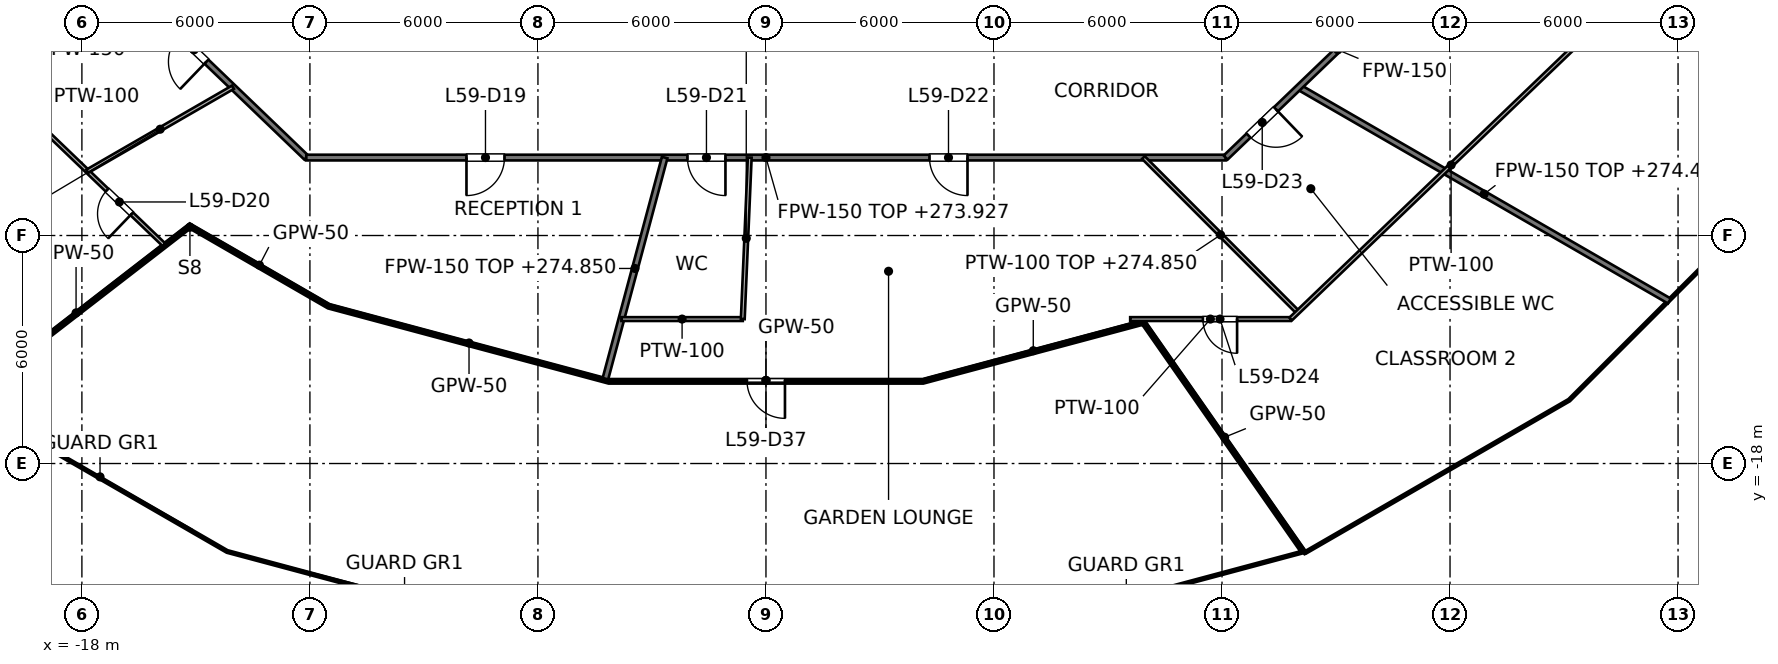
"""IFC4 building model, lengths in metres.
Left out: names, types, materials, properties, quantities, classifications, styles, units other than length and angle.
Written with IfcOpenShell. Run it as: python <this file> out.ifc"""

import sys

from ifc_helpers import new_model, si_unit, direction, frame, frame_2d, origin, place, context, subcontext, project, spatial, rectangle, extrude, element, fill, save


model = new_model("IFC4")
c1 = context("Model", 3, precision=1e-05, world=origin(), true_north=direction((0.0, 1.0)))
c2 = subcontext(c1, "Body", "Model", "MODEL_VIEW")
j1 = project(units=[si_unit("LENGTHUNIT", "METRE"), si_unit("PLANEANGLEUNIT", "RADIAN")], contexts=[c1])
p1 = place(None, origin())
s1 = spatial("IfcSite", under=j1, at=p1, CompositionType="ELEMENT")
p2 = place(p1, origin())
s2 = spatial("IfcBuilding", under=s1, at=p2, CompositionType="ELEMENT")
p3 = place(p2, frame((0.0, 0.0, 271.0)))
s3 = spatial("IfcBuildingStorey", under=s2, at=p3, CompositionType="ELEMENT", Elevation=271.0)
p4 = place(p3, frame((-18.0, -4.278, 0.0), z_axis=(0.0, 0.0, 1.0), x_axis=(0.721260976692, -0.69266341285, 0.0)))
e1 = element("IfcWall", 1, at=p4, inside=s3, PredefinedType="PARTITIONING", context=c2, shape_type="SweptSolid", body=[
    extrude(rectangle(XDim=8.187, YDim=0.15, at=frame_2d((4.094, 0.0))), origin(), (0.0, 0.0, 1.0), 2.918),
])
p5 = place(p4, frame((3.544, 0.0, 0.0)))
e2 = element("IfcOpeningElement", 2, at=p5, cuts=e1, PredefinedType="OPENING", context=c2, shape_type="SweptSolid", body=[
    extrude(rectangle(XDim=1.0, YDim=2.1, at=frame_2d((0.5, 1.05))), frame((0.0, 0.075, 0.0), z_axis=(0.0, -1.0, 0.0), x_axis=(1.0, 0.0, 0.0)), (0.0, 0.0, 1.0), 0.15),
])
p6 = place(p3, frame((14.024, -8.096, 0.0), z_axis=(0.0, 0.0, 1.0), x_axis=(0.866020158842, -0.500009084397, 0.0)))
e3 = element("IfcWall", 3, at=p6, inside=s3, PredefinedType="PARTITIONING", context=c2, shape_type="SweptSolid", body=[
    extrude(rectangle(XDim=11.256, YDim=0.15, at=frame_2d((5.628, 0.0))), origin(), (0.0, 0.0, 1.0), 3.475),
])
p7 = place(p3, frame((-12.095, -9.949, 0.0), z_axis=(0.0, 0.0, 1.0), x_axis=(1.0, 0.0, 0.0)))
e4 = element("IfcWall", 4, at=p7, inside=s3, PredefinedType="PARTITIONING", context=c2, shape_type="SweptSolid", body=[
    extrude(rectangle(XDim=24.19, YDim=0.15, at=frame_2d((12.095, 0.0))), origin(), (0.0, 0.0, 1.0), 2.927),
])
p8 = place(p7, frame((4.215, 0.0, 0.0)))
e5 = element("IfcOpeningElement", 5, at=p8, cuts=e4, PredefinedType="OPENING", context=c2, shape_type="SweptSolid", body=[
    extrude(rectangle(XDim=1.0, YDim=2.1, at=frame_2d((0.5, 1.05))), frame((0.0, 0.075, 0.0), z_axis=(0.0, -1.0, 0.0), x_axis=(1.0, 0.0, 0.0)), (0.0, 0.0, 1.0), 0.15),
])
p9 = place(p7, frame((10.029, 0.0, 0.0)))
e6 = element("IfcOpeningElement", 6, at=p9, cuts=e4, PredefinedType="OPENING", context=c2, shape_type="SweptSolid", body=[
    extrude(rectangle(XDim=1.0, YDim=2.1, at=frame_2d((0.5, 1.05))), frame((0.0, 0.075, 0.0), z_axis=(0.0, -1.0, 0.0), x_axis=(1.0, 0.0, 0.0)), (0.0, 0.0, 1.0), 0.15),
])
p10 = place(p7, frame((16.398, 0.0, 0.0)))
e7 = element("IfcOpeningElement", 7, at=p10, cuts=e4, PredefinedType="OPENING", context=c2, shape_type="SweptSolid", body=[
    extrude(rectangle(XDim=1.0, YDim=2.1, at=frame_2d((0.5, 1.05))), frame((0.0, 0.075, 0.0), z_axis=(0.0, -1.0, 0.0), x_axis=(1.0, 0.0, 0.0)), (0.0, 0.0, 1.0), 0.15),
])
p11 = place(p3, frame((12.095, -9.949, 0.0), z_axis=(0.0, 0.0, 1.0), x_axis=(0.721246078931, 0.692678925352, 0.0)))
e8 = element("IfcWall", 8, at=p11, inside=s3, PredefinedType="PARTITIONING", context=c2, shape_type="SweptSolid", body=[
    extrude(rectangle(XDim=8.187, YDim=0.15, at=frame_2d((4.094, 0.0))), origin(), (0.0, 0.0, 1.0), 2.918),
])
p12 = place(p11, frame((0.836, 0.0, 0.0)))
e9 = element("IfcOpeningElement", 9, at=p12, cuts=e8, PredefinedType="OPENING", context=c2, shape_type="SweptSolid", body=[
    extrude(rectangle(XDim=1.0, YDim=2.1, at=frame_2d((0.5, 1.05))), frame((0.0, 0.075, 0.0), z_axis=(0.0, -1.0, 0.0), x_axis=(1.0, 0.0, 0.0)), (0.0, 0.0, 1.0), 0.15),
])
p13 = place(p3, frame((-4.229, -15.785, 0.0), z_axis=(0.0, 0.0, 1.0), x_axis=(0.258789276249, 0.965933802338, 0.0)))
e10 = element("IfcWall", 10, at=p13, inside=s3, PredefinedType="PARTITIONING", context=c2, shape_type="SweptSolid", body=[
    extrude(rectangle(XDim=6.042, YDim=0.15, at=frame_2d((3.021, 0.0))), origin(), (0.0, 0.0, 1.0), 3.85),
])
p14 = place(p3, frame((9.94, -14.255, 0.0), z_axis=(0.0, 0.0, 1.0), x_axis=(0.571993311717, -0.820258283318, 0.0)))
e11 = element("IfcWall", 11, at=p14, inside=s3, PredefinedType="PARTITIONING", context=c2, shape_type="SweptSolid", body=[
    extrude(rectangle(XDim=7.444, YDim=0.05, at=frame_2d((3.722, 0.0))), origin(), (0.0, 0.0, 1.0), 2.927),
])
p15 = place(p3, frame((-15.161, -11.722, 0.0), z_axis=(0.0, 0.0, 1.0), x_axis=(0.866015533237, -0.5000170959, 0.0)))
e12 = element("IfcWall", 12, at=p15, inside=s3, PredefinedType="PARTITIONING", context=c2, shape_type="SweptSolid", body=[
    extrude(rectangle(XDim=4.232, YDim=0.05, at=frame_2d((2.116, 0.0))), origin(), (0.0, 0.0, 1.0), 2.927),
])
p16 = place(p3, frame((-11.496, -13.838, 0.0), z_axis=(0.0, 0.0, 1.0), x_axis=(0.965689277524, -0.259700248891, 0.0)))
e13 = element("IfcWall", 13, at=p16, inside=s3, PredefinedType="PARTITIONING", context=c2, shape_type="SweptSolid", body=[
    extrude(rectangle(XDim=7.627, YDim=0.05, at=frame_2d((3.813, 0.0))), origin(), (0.0, 0.0, 1.0), 2.927),
])
p17 = place(p3, frame((-4.129, -15.812, 0.0), z_axis=(0.0, 0.0, 1.0), x_axis=(1.0, 0.0, 0.0)))
e14 = element("IfcWall", 14, at=p17, inside=s3, PredefinedType="PARTITIONING", context=c2, shape_type="SweptSolid", body=[
    extrude(rectangle(XDim=8.258, YDim=0.05, at=frame_2d((4.129, 0.0))), origin(), (0.0, 0.0, 1.0), 2.927),
])
p18 = place(p17, frame((3.629, 0.0, 0.0)))
e15 = element("IfcOpeningElement", 15, at=p18, cuts=e14, PredefinedType="OPENING", context=c2, shape_type="SweptSolid", body=[
    extrude(rectangle(XDim=1.0, YDim=2.1, at=frame_2d((0.5, 1.05))), frame((0.0, 0.025, 0.0), z_axis=(0.0, -1.0, 0.0), x_axis=(1.0, 0.0, 0.0)), (0.0, 0.0, 1.0), 0.05),
])
p19 = place(p3, frame((4.129, -15.812, 0.0), z_axis=(0.0, 0.0, 1.0), x_axis=(0.965726557123, 0.259561585887, 0.0)))
e16 = element("IfcWall", 16, at=p19, inside=s3, PredefinedType="PARTITIONING", context=c2, shape_type="SweptSolid", body=[
    extrude(rectangle(XDim=6.016, YDim=0.05, at=frame_2d((3.008, 0.0))), origin(), (0.0, 0.0, 1.0), 2.927),
])
p20 = place(p3, frame((-21.146, -16.349, 0.0), z_axis=(0.0, 0.0, 1.0), x_axis=(0.791194145186, 0.611565061644, 0.0)))
e17 = element("IfcWall", 17, at=p20, inside=s3, PredefinedType="PARTITIONING", context=c2, shape_type="SweptSolid", body=[
    extrude(rectangle(XDim=7.565, YDim=0.05, at=frame_2d((3.782, 0.0))), origin(), (0.0, 0.0, 1.0), 2.927),
])
p21 = place(p3, frame((9.932, -9.949, 0.0), z_axis=(0.0, 0.0, 1.0), x_axis=(0.70649080711, -0.707722219143, 0.0)))
e18 = element("IfcWall", 18, at=p21, inside=s3, PredefinedType="PARTITIONING", context=c2, shape_type="SweptSolid", body=[
    extrude(rectangle(XDim=5.75, YDim=0.1, at=frame_2d((2.875, 0.0))), origin(), (0.0, 0.0, 1.0), 3.85),
])
p22 = place(p3, frame((-22.25, -6.089, 0.0), z_axis=(0.0, 0.0, 1.0), x_axis=(0.721325844404, -0.692595860654, 0.0)))
e19 = element("IfcWall", 19, at=p22, inside=s3, PredefinedType="PARTITIONING", context=c2, shape_type="SweptSolid", body=[
    extrude(rectangle(XDim=8.889, YDim=0.1, at=frame_2d((4.444, 0.0))), origin(), (0.0, 0.0, 1.0), 2.927),
])
p23 = place(p22, frame((6.81, 0.0, 0.0)))
e20 = element("IfcOpeningElement", 20, at=p23, cuts=e19, PredefinedType="OPENING", context=c2, shape_type="SweptSolid", body=[
    extrude(rectangle(XDim=0.9, YDim=2.1, at=frame_2d((0.45, 1.05))), frame((0.0, 0.05, 0.0), z_axis=(0.0, -1.0, 0.0), x_axis=(1.0, 0.0, 0.0)), (0.0, 0.0, 1.0), 0.1),
])
p24 = place(p3, frame((-3.804, -14.199, 0.0), z_axis=(0.0, 0.0, 1.0), x_axis=(1.0, 0.0, 0.0)))
e21 = element("IfcWall", 21, at=p24, inside=s3, PredefinedType="PARTITIONING", context=c2, shape_type="SweptSolid", body=[
    extrude(rectangle(XDim=3.194, YDim=0.1, at=frame_2d((1.597, 0.0))), origin(), (0.0, 0.0, 1.0), 2.927),
])
p25 = place(p3, frame((9.584, -14.199, 0.0), z_axis=(0.0, 0.0, 1.0), x_axis=(1.0, 0.0, 0.0)))
e22 = element("IfcWall", 22, at=p25, inside=s3, PredefinedType="PARTITIONING", context=c2, shape_type="SweptSolid", body=[
    extrude(rectangle(XDim=4.221, YDim=0.1, at=frame_2d((2.11, 0.0))), origin(), (0.0, 0.0, 1.0), 2.927),
])
p26 = place(p25, frame((1.913, 0.0, 0.0)))
e23 = element("IfcOpeningElement", 23, at=p26, cuts=e22, PredefinedType="OPENING", context=c2, shape_type="SweptSolid", body=[
    extrude(rectangle(XDim=0.9, YDim=2.1, at=frame_2d((0.45, 1.05))), frame((0.0, 0.05, 0.0), z_axis=(0.0, -1.0, 0.0), x_axis=(1.0, 0.0, 0.0)), (0.0, 0.0, 1.0), 0.1),
])
p27 = place(p3, frame((-17.856, -10.309, 0.0), z_axis=(0.0, 0.0, 1.0), x_axis=(0.866051440883, 0.49995489971, 0.0)))
e24 = element("IfcWall", 24, at=p27, inside=s3, PredefinedType="PARTITIONING", context=c2, shape_type="SweptSolid", body=[
    extrude(rectangle(XDim=4.425, YDim=0.1, at=frame_2d((2.212, 0.0))), origin(), (0.0, 0.0, 1.0), 3.85),
])
p28 = place(p3, frame((13.805, -14.199, 0.0), z_axis=(0.0, 0.0, 1.0), x_axis=(0.721419404794, 0.692498406053, 0.0)))
e25 = element("IfcWall", 25, at=p28, inside=s3, PredefinedType="PARTITIONING", context=c2, shape_type="SweptSolid", body=[
    extrude(rectangle(XDim=11.708, YDim=0.1, at=frame_2d((5.854, 0.0))), origin(), (0.0, 0.0, 1.0), 2.927),
])
p29 = place(p3, frame((-0.61, -14.199, 0.0), z_axis=(0.0, 0.0, 1.0), x_axis=(0.04304370936, 0.999073190054, 0.0)))
e26 = element("IfcWall", 26, at=p29, inside=s3, PredefinedType="PARTITIONING", context=c2, shape_type="SweptSolid", body=[
    extrude(rectangle(XDim=4.254, YDim=0.1, at=frame_2d((2.127, 0.0))), origin(), (0.0, 0.0, 1.0), 3.85),
])
p30 = place(p5, origin())
e27 = element("IfcDoor", 27, at=p30, inside=s3, OperationType="SINGLE_SWING_RIGHT", PredefinedType="DOOR", context=c2, shape_type="SweptSolid", body=[
    extrude(rectangle(XDim=1.0, YDim=2.1, at=frame_2d((0.5, 1.05))), frame((0.0, 0.025, 0.0), z_axis=(0.0, -1.0, 0.0), x_axis=(1.0, 0.0, 0.0)), (0.0, 0.0, 1.0), 0.05),
])
fill(e2, e27)
p31 = place(p8, origin())
e28 = element("IfcDoor", 28, at=p31, inside=s3, OperationType="SINGLE_SWING_LEFT", PredefinedType="DOOR", context=c2, shape_type="SweptSolid", body=[
    extrude(rectangle(XDim=1.0, YDim=2.1, at=frame_2d((0.5, 1.05))), frame((0.0, 0.025, 0.0), z_axis=(0.0, -1.0, 0.0), x_axis=(1.0, 0.0, 0.0)), (0.0, 0.0, 1.0), 0.05),
])
fill(e5, e28)
p32 = place(p23, origin())
e29 = element("IfcDoor", 29, at=p32, inside=s3, OperationType="SINGLE_SWING_RIGHT", PredefinedType="DOOR", context=c2, shape_type="SweptSolid", body=[
    extrude(rectangle(XDim=0.9, YDim=2.1, at=frame_2d((0.45, 1.05))), frame((0.0, 0.025, 0.0), z_axis=(0.0, -1.0, 0.0), x_axis=(1.0, 0.0, 0.0)), (0.0, 0.0, 1.0), 0.05),
])
fill(e20, e29)
p33 = place(p9, origin())
e30 = element("IfcDoor", 30, at=p33, inside=s3, OperationType="SINGLE_SWING_RIGHT", PredefinedType="DOOR", context=c2, shape_type="SweptSolid", body=[
    extrude(rectangle(XDim=1.0, YDim=2.1, at=frame_2d((0.5, 1.05))), frame((0.0, 0.025, 0.0), z_axis=(0.0, -1.0, 0.0), x_axis=(1.0, 0.0, 0.0)), (0.0, 0.0, 1.0), 0.05),
])
fill(e6, e30)
p34 = place(p10, origin())
e31 = element("IfcDoor", 31, at=p34, inside=s3, OperationType="SINGLE_SWING_RIGHT", PredefinedType="DOOR", context=c2, shape_type="SweptSolid", body=[
    extrude(rectangle(XDim=1.0, YDim=2.1, at=frame_2d((0.5, 1.05))), frame((0.0, 0.025, 0.0), z_axis=(0.0, -1.0, 0.0), x_axis=(1.0, 0.0, 0.0)), (0.0, 0.0, 1.0), 0.05),
])
fill(e7, e31)
p35 = place(p12, origin())
e32 = element("IfcDoor", 32, at=p35, inside=s3, OperationType="SINGLE_SWING_RIGHT", PredefinedType="DOOR", context=c2, shape_type="SweptSolid", body=[
    extrude(rectangle(XDim=1.0, YDim=2.1, at=frame_2d((0.5, 1.05))), frame((0.0, 0.025, 0.0), z_axis=(0.0, -1.0, 0.0), x_axis=(1.0, 0.0, 0.0)), (0.0, 0.0, 1.0), 0.05),
])
fill(e9, e32)
p36 = place(p26, origin())
e33 = element("IfcDoor", 33, at=p36, inside=s3, OperationType="SINGLE_SWING_RIGHT", PredefinedType="DOOR", context=c2, shape_type="SweptSolid", body=[
    extrude(rectangle(XDim=0.9, YDim=2.1, at=frame_2d((0.45, 1.05))), frame((0.0, 0.025, 0.0), z_axis=(0.0, -1.0, 0.0), x_axis=(1.0, 0.0, 0.0)), (0.0, 0.0, 1.0), 0.05),
])
fill(e23, e33)
p37 = place(p18, origin())
e34 = element("IfcDoor", 34, at=p37, inside=s3, OperationType="SINGLE_SWING_RIGHT", PredefinedType="DOOR", context=c2, shape_type="SweptSolid", body=[
    extrude(rectangle(XDim=1.0, YDim=2.1, at=frame_2d((0.5, 1.05))), frame((0.0, 0.025, 0.0), z_axis=(0.0, -1.0, 0.0), x_axis=(1.0, 0.0, 0.0)), (0.0, 0.0, 1.0), 0.05),
])
fill(e15, e34)
save(model, sys.argv[1])
